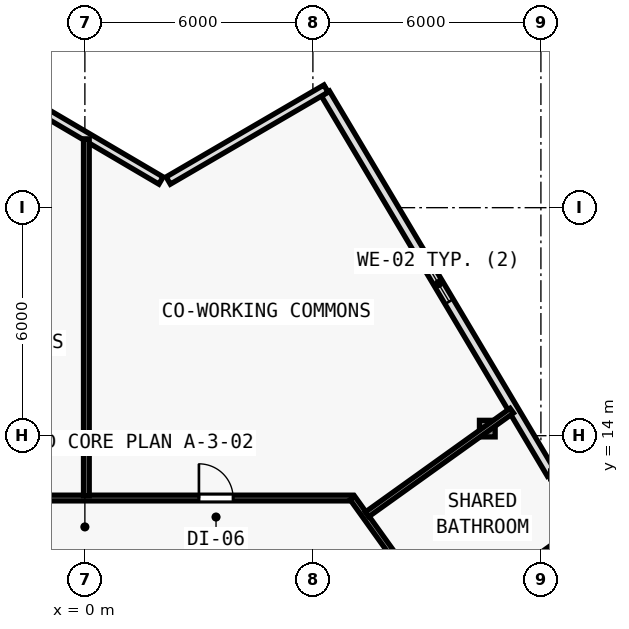
"""IFC4 building model, lengths in metres.
Left out: names, types, materials, properties, quantities, classifications, styles, units other than length and angle.
Written with IfcOpenShell. Run it as: python <this file> out.ifc"""

import sys

from ifc_helpers import new_model, si_unit, direction, frame, frame_2d, origin, origin_2d, place, context, subcontext, project, spatial, rectangle, i_section, extrude, element, fill, save


model = new_model("IFC4")
c1 = context("Model", 3, precision=1e-05, world=origin(), true_north=direction((0.0, 1.0)))
c2 = subcontext(c1, "Body", "Model", "MODEL_VIEW")
j1 = project(units=[si_unit("LENGTHUNIT", "METRE"), si_unit("PLANEANGLEUNIT", "RADIAN")], contexts=[c1])
p1 = place(None, origin())
s1 = spatial("IfcSite", under=j1, at=p1, CompositionType="ELEMENT")
p2 = place(p1, origin())
s2 = spatial("IfcBuilding", under=s1, at=p2, CompositionType="ELEMENT")
p3 = place(p2, frame((0.0, 0.0, 51.6)))
s3 = spatial("IfcBuildingStorey", under=s2, at=p3, CompositionType="ELEMENT", Elevation=51.6)
p4 = place(p3, frame((10.589, 14.186, 0.005), z_axis=(-0.011699046613, -0.002516655376, 0.999928396814), x_axis=(0.210305364179, -0.977635746993, 0.0)))
e1 = element("IfcColumn", 1, at=p4, inside=s3, PredefinedType="COLUMN", context=c2, shape_type="SweptSolid", body=[
    extrude(i_section(OverallWidth=0.412, OverallDepth=0.435, WebThickness=0.023, FlangeThickness=0.037, FilletRadius=0.015, at=origin_2d()), origin(), (0.0, 0.0, 1.0), 3.589),
])
p5 = place(p3, frame((6.328, 23.006, 0.0), z_axis=(0.0, 0.0, 1.0), x_axis=(0.511075811474, -0.859535639125, 0.0)))
e2 = element("IfcWall", 2, at=p5, inside=s3, PredefinedType="SOLIDWALL", context=c2, shape_type="SweptSolid", body=[
    extrude(rectangle(XDim=11.646, YDim=0.25, at=frame_2d((5.823, 0.0))), origin(), (0.0, 0.0, 1.0), 3.35),
])
p6 = place(p5, frame((5.273, 0.0, 0.62)))
e3 = element("IfcOpeningElement", 3, at=p6, cuts=e2, PredefinedType="OPENING", context=c2, shape_type="SweptSolid", body=[
    extrude(rectangle(XDim=1.1, YDim=1.8, at=frame_2d((0.55, 0.9))), frame((0.0, 0.135, 0.0), z_axis=(0.0, -1.0, 0.0), x_axis=(1.0, 0.0, 0.0)), (0.0, 0.0, 1.0), 0.27),
])
p7 = place(p3, frame((2.193, 20.713, 0.0), z_axis=(0.0, 0.0, 1.0), x_axis=(0.863964978951, 0.503551899159, 0.0)))
e4 = element("IfcWall", 4, at=p7, inside=s3, PredefinedType="SOLIDWALL", context=c2, shape_type="SweptSolid", body=[
    extrude(rectangle(XDim=4.805, YDim=0.22, at=frame_2d((2.402, 0.0))), origin(), (0.0, 0.0, 1.0), 3.35),
])
p8 = place(p3, frame((-2.572, 23.403, 0.0), z_axis=(0.0, 0.0, 1.0), x_axis=(0.862137551275, -0.506674296449, 0.0)))
e5 = element("IfcWall", 5, at=p8, inside=s3, PredefinedType="SOLIDWALL", context=c2, shape_type="SweptSolid", body=[
    extrude(rectangle(XDim=5.307, YDim=0.22, at=frame_2d((2.654, 0.0))), origin(), (0.0, 0.0, 1.0), 3.35),
])
p9 = place(p3, frame((-7.041, 12.36, 0.0), z_axis=(0.0, 0.0, 1.0), x_axis=(1.0, 0.0, 0.0)))
e6 = element("IfcWall", 6, at=p9, inside=s3, PredefinedType="PARTITIONING", context=c2, shape_type="SweptSolid", body=[
    extrude(rectangle(XDim=14.082, YDim=0.15, at=frame_2d((7.041, 0.0))), origin(), (0.0, 0.0, 1.0), 3.35),
])
p10 = place(p9, frame((10.042, 0.0, 0.0)))
e7 = element("IfcOpeningElement", 7, at=p10, cuts=e6, PredefinedType="OPENING", context=c2, shape_type="SweptSolid", body=[
    extrude(rectangle(XDim=0.9, YDim=2.1, at=frame_2d((0.45, 1.05))), frame((0.0, 0.085, 0.0), z_axis=(0.0, -1.0, 0.0), x_axis=(1.0, 0.0, 0.0)), (0.0, 0.0, 1.0), 0.17),
])
p11 = place(p9, frame((3.179, 0.0, 0.0)))
e8 = element("IfcOpeningElement", 8, at=p11, cuts=e6, PredefinedType="OPENING", context=c2, shape_type="SweptSolid", body=[
    extrude(rectangle(XDim=0.9, YDim=2.1, at=frame_2d((0.45, 1.05))), frame((0.0, 0.085, 0.0), z_axis=(0.0, -1.0, 0.0), x_axis=(1.0, 0.0, 0.0)), (0.0, 0.0, 1.0), 0.17),
])
p12 = place(p3, frame((7.041, 12.36, 0.0), z_axis=(0.0, 0.0, 1.0), x_axis=(0.582449511476, -0.812866881218, 0.0)))
e9 = element("IfcWall", 9, at=p12, inside=s3, PredefinedType="PARTITIONING", context=c2, shape_type="SweptSolid", body=[
    extrude(rectangle(XDim=4.84, YDim=0.15, at=frame_2d((2.42, 0.0))), origin(), (0.0, 0.0, 1.0), 2.725),
])
p13 = place(p12, frame((2.801, 0.0, 0.0)))
e10 = element("IfcOpeningElement", 10, at=p13, cuts=e9, PredefinedType="OPENING", context=c2, shape_type="SweptSolid", body=[
    extrude(rectangle(XDim=0.85, YDim=2.1, at=frame_2d((0.425, 1.05))), frame((0.0, 0.085, 0.0), z_axis=(0.0, -1.0, 0.0), x_axis=(1.0, 0.0, 0.0)), (0.0, 0.0, 1.0), 0.17),
])
p14 = place(p3, frame((7.424, 11.929, 0.0), z_axis=(0.0, 0.0, 1.0), x_axis=(0.812887830599, 0.582420273397, 0.0)))
e11 = element("IfcWall", 11, at=p14, inside=s3, PredefinedType="PARTITIONING", context=c2, shape_type="SweptSolid", body=[
    extrude(rectangle(XDim=4.687, YDim=0.15, at=frame_2d((2.343, 0.0))), origin(), (0.0, 0.0, 1.0), 2.725),
])
p15 = place(p3, frame((9.494, 9.039, 0.0), z_axis=(0.0, 0.0, 1.0), x_axis=(0.812885700903, 0.582423245816, 0.0)))
e12 = element("IfcWall", 12, at=p15, inside=s3, PredefinedType="PARTITIONING", context=c2, shape_type="SweptSolid", body=[
    extrude(rectangle(XDim=4.383, YDim=0.15, at=frame_2d((2.191, 0.0))), origin(), (0.0, 0.0, 1.0), 2.735),
])
p16 = place(p3, frame((0.039, 12.42, 0.0), z_axis=(0.0, 0.0, 1.0), x_axis=(0.0, 1.0, 0.0)))
e13 = element("IfcWall", 13, at=p16, inside=s3, PredefinedType="PARTITIONING", context=c2, shape_type="SweptSolid", body=[
    extrude(rectangle(XDim=9.39, YDim=0.15, at=frame_2d((4.695, 0.0))), origin(), (0.0, 0.0, 1.0), 2.735),
])
p17 = place(p6, origin())
e14 = element("IfcWindow", 14, at=p17, inside=s3, PartitioningType="SINGLE_PANEL", PredefinedType="WINDOW", context=c2, shape_type="SweptSolid", body=[
    extrude(rectangle(XDim=1.1, YDim=1.8, at=frame_2d((0.55, 0.9))), frame((0.0, 0.03, 0.0), z_axis=(0.0, -1.0, 0.0), x_axis=(1.0, 0.0, 0.0)), (0.0, 0.0, 1.0), 0.06),
])
fill(e3, e14)
p18 = place(p10, origin())
e15 = element("IfcDoor", 15, at=p18, inside=s3, OperationType="SINGLE_SWING_LEFT", PredefinedType="DOOR", context=c2, shape_type="SweptSolid", body=[
    extrude(rectangle(XDim=0.9, YDim=2.1, at=frame_2d((0.45, 1.05))), frame((0.0, 0.025, 0.0), z_axis=(0.0, -1.0, 0.0), x_axis=(1.0, 0.0, 0.0)), (0.0, 0.0, 1.0), 0.05),
])
fill(e7, e15)
save(model, sys.argv[1])
